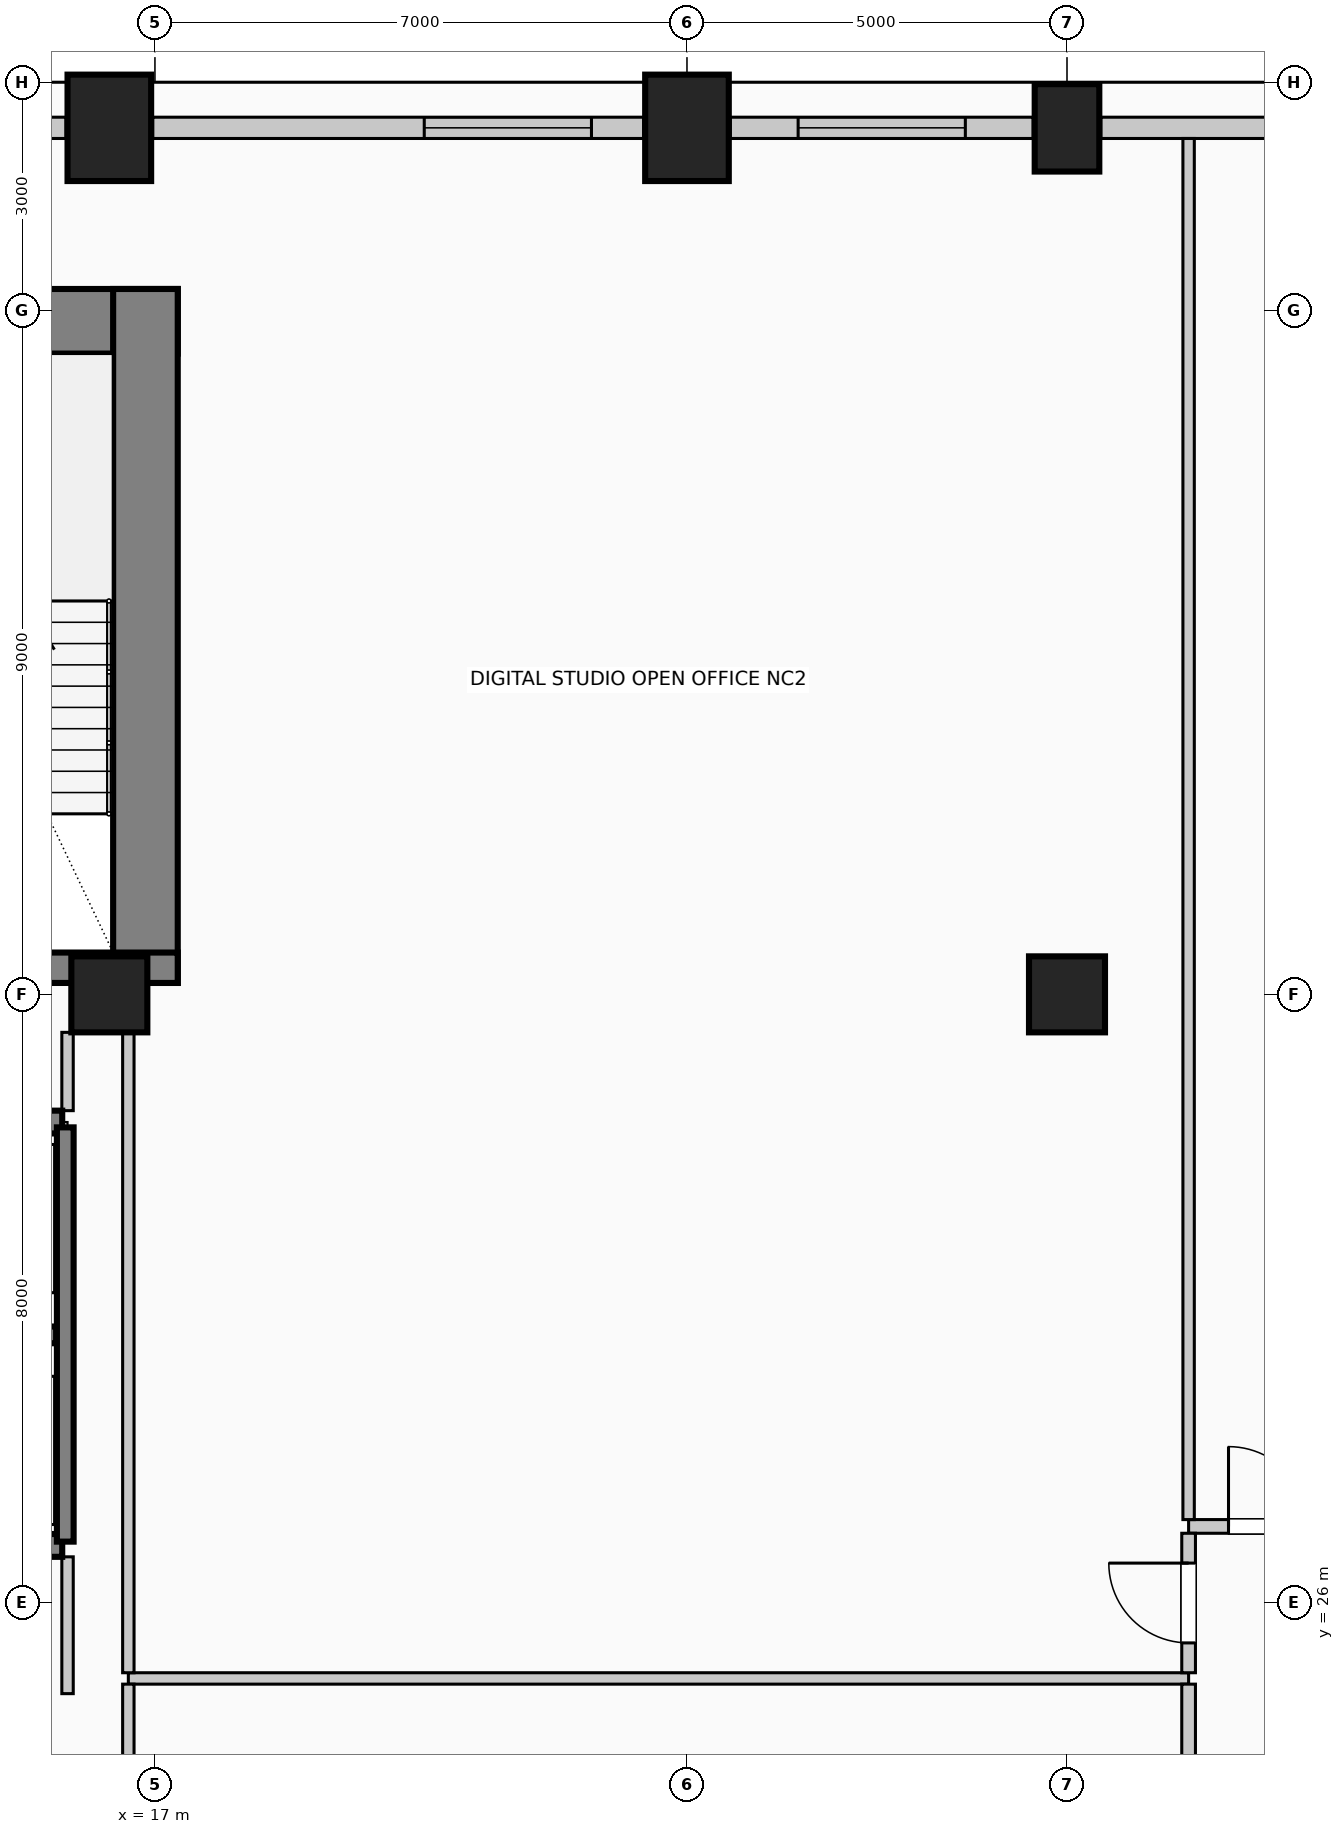
"""IFC4 building model, lengths in metres.
Left out: names, types, materials, properties, quantities, classifications, styles, units other than length and angle.
Written with IfcOpenShell. Run it as: python <this file> out.ifc"""

import sys

from ifc_helpers import new_model, si_unit, direction, frame, frame_2d, origin, origin_2d, place, context, subcontext, project, spatial, rectangle, circle, extrude, element, fill, save


model = new_model("IFC4")
c1 = context("Model", 3, precision=1e-05, world=origin(), true_north=direction((0.0, 1.0)))
c2 = subcontext(c1, "Body", "Model", "MODEL_VIEW")
j1 = project(units=[si_unit("LENGTHUNIT", "METRE"), si_unit("PLANEANGLEUNIT", "RADIAN")], contexts=[c1])
p1 = place(None, origin())
s1 = spatial("IfcSite", under=j1, at=p1, CompositionType="ELEMENT")
p2 = place(p1, origin())
s2 = spatial("IfcBuilding", under=s1, at=p2, CompositionType="ELEMENT")
p3 = place(p2, frame((0.0, 0.0, 92.6)))
s3 = spatial("IfcBuildingStorey", under=s2, at=p3, CompositionType="ELEMENT", Elevation=92.6)
p4 = place(p3, frame((2.7, 42.855, 0.0), z_axis=(0.0, 0.0, 1.0), x_axis=(1.0, 0.0, 0.0)))
e1 = element("IfcWall", 1, at=p4, inside=s3, PredefinedType="SHEAR", context=c2, shape_type="SweptSolid", body=[
    extrude(rectangle(XDim=14.6, YDim=0.85, at=frame_2d((7.3, 0.0))), origin(), (0.0, 0.0, 1.0), 4.0),
])
p5 = place(p3, frame((16.875, 34.15, 0.0), z_axis=(0.0, 0.0, 1.0), x_axis=(0.0, 1.0, 0.0)))
e2 = element("IfcWall", 2, at=p5, inside=s3, PredefinedType="SHEAR", context=c2, shape_type="SweptSolid", body=[
    extrude(rectangle(XDim=9.13, YDim=0.85, at=frame_2d((4.565, 0.0))), origin(), (0.0, 0.0, 1.0), 4.0),
])
p6 = place(p3, frame((12.29, 34.35, 0.0), z_axis=(0.0, 0.0, 1.0), x_axis=(1.0, 0.0, 0.0)))
e3 = element("IfcWall", 3, at=p6, inside=s3, PredefinedType="SHEAR", context=c2, shape_type="SweptSolid", body=[
    extrude(rectangle(XDim=5.01, YDim=0.4, at=frame_2d((2.505, 0.0))), origin(), (0.0, 0.0, 1.0), 4.0),
])
p7 = place(p6, frame((1.4, 0.0, 0.0)))
e4 = element("IfcOpeningElement", 4, at=p7, cuts=e3, PredefinedType="OPENING", context=c2, shape_type="SweptSolid", body=[
    extrude(rectangle(XDim=1.15, YDim=2.2, at=frame_2d((0.575, 1.1))), frame((0.0, 0.21, 0.0), z_axis=(0.0, -1.0, 0.0), x_axis=(1.0, 0.0, 0.0)), (0.0, 0.0, 1.0), 0.42),
])
for number, where, z_axis, x_axis in (
    (5, (16.4, 45.4, 0.0), (0.0, 0.0, 1.0), (1.0, 0.0, 0.0)),
    (6, (24.0, 45.4, 0.0), (0.0, 0.0, 1.0), (1.0, 0.0, 0.0)),
):
    element("IfcColumn", number, at=place(p3, frame(where, z_axis=z_axis, x_axis=x_axis)), inside=s3, PredefinedType="COLUMN", context=c2, shape_type="SweptSolid", body=[
        extrude(rectangle(XDim=1.1, YDim=1.4, at=origin_2d()), origin(), (0.0, 0.0, 1.0), 4.0),
    ])
p8 = place(p3, frame((29.0, 45.4, 0.0), z_axis=(0.0, 0.0, 1.0), x_axis=(1.0, 0.0, 0.0)))
e7 = element("IfcColumn", 7, at=p8, inside=s3, PredefinedType="COLUMN", context=c2, shape_type="SweptSolid", body=[
    extrude(rectangle(XDim=0.85, YDim=1.15, at=origin_2d()), origin(), (0.0, 0.0, 1.0), 4.0),
])
for number, where, z_axis, x_axis in (
    (8, (16.4, 34.0, 0.0), (0.0, 0.0, 1.0), (1.0, 0.0, 0.0)),
    (9, (29.0, 34.0, 0.0), (0.0, 0.0, 1.0), (1.0, 0.0, 0.0)),
):
    element("IfcColumn", number, at=place(p3, frame(where, z_axis=z_axis, x_axis=x_axis)), inside=s3, PredefinedType="COLUMN", context=c2, shape_type="SweptSolid", body=[
        extrude(circle(Radius=0.5, at=origin_2d()), origin(), (0.0, 0.0, 1.0), 4.0),
    ])
p9 = place(p3, frame((14.445, 45.4, 0.0), z_axis=(0.0, 0.0, 1.0), x_axis=(1.0, 0.0, 0.0)))
e10 = element("IfcWall", 10, at=p9, inside=s3, PredefinedType="SOLIDWALL", context=c2, shape_type="SweptSolid", body=[
    extrude(rectangle(XDim=1.385, YDim=0.28, at=frame_2d((0.692, 0.0))), origin(), (0.0, 0.0, 1.0), 2.875),
])
p10 = place(p3, frame((16.97, 45.4, 0.0), z_axis=(0.0, 0.0, 1.0), x_axis=(1.0, 0.0, 0.0)))
e11 = element("IfcWall", 11, at=p10, inside=s3, PredefinedType="SOLIDWALL", context=c2, shape_type="SweptSolid", body=[
    extrude(rectangle(XDim=6.46, YDim=0.28, at=frame_2d((3.23, 0.0))), origin(), (0.0, 0.0, 1.0), 2.875),
])
p11 = place(p10, frame((3.573, 0.0, 0.5)))
e12 = element("IfcOpeningElement", 12, at=p11, cuts=e11, PredefinedType="OPENING", context=c2, shape_type="SweptSolid", body=[
    extrude(rectangle(XDim=2.2, YDim=1.95, at=frame_2d((1.1, 0.975))), frame((0.0, 0.15, 0.0), z_axis=(0.0, -1.0, 0.0), x_axis=(1.0, 0.0, 0.0)), (0.0, 0.0, 1.0), 0.3),
])
p12 = place(p3, frame((24.57, 45.4, 0.0), z_axis=(0.0, 0.0, 1.0), x_axis=(1.0, 0.0, 0.0)))
e13 = element("IfcWall", 13, at=p12, inside=s3, PredefinedType="SOLIDWALL", context=c2, shape_type="SweptSolid", body=[
    extrude(rectangle(XDim=3.985, YDim=0.28, at=frame_2d((1.992, 0.0))), origin(), (0.0, 0.0, 1.0), 2.875),
])
p13 = place(p12, frame((0.893, 0.0, 0.5)))
e14 = element("IfcOpeningElement", 14, at=p13, cuts=e13, PredefinedType="OPENING", context=c2, shape_type="SweptSolid", body=[
    extrude(rectangle(XDim=2.2, YDim=1.95, at=frame_2d((1.1, 0.975))), frame((0.0, 0.15, 0.0), z_axis=(0.0, -1.0, 0.0), x_axis=(1.0, 0.0, 0.0)), (0.0, 0.0, 1.0), 0.3),
])
p14 = place(p3, frame((29.445, 45.4, 0.0), z_axis=(0.0, 0.0, 1.0), x_axis=(1.0, 0.0, 0.0)))
e15 = element("IfcWall", 15, at=p14, inside=s3, PredefinedType="SOLIDWALL", context=c2, shape_type="SweptSolid", body=[
    extrude(rectangle(XDim=3.985, YDim=0.28, at=frame_2d((1.992, 0.0))), origin(), (0.0, 0.0, 1.0), 2.875),
])
p15 = place(p3, frame((15.78, 26.75, 0.0), z_axis=(0.0, 0.0, 1.0), x_axis=(-1.0, 0.0, 0.0)))
e16 = element("IfcWall", 16, at=p15, inside=s3, PredefinedType="SOLIDWALL", context=c2, shape_type="SweptSolid", body=[
    extrude(rectangle(XDim=1.78, YDim=0.3, at=frame_2d((0.89, 0.0))), origin(), (0.0, 0.0, 1.0), 4.0),
])
p16 = place(p15, frame((0.34, 0.0, 0.0)))
e17 = element("IfcOpeningElement", 17, at=p16, cuts=e16, PredefinedType="OPENING", context=c2, shape_type="SweptSolid", body=[
    extrude(rectangle(XDim=1.1, YDim=2.2, at=frame_2d((0.55, 1.1))), frame((0.0, 0.16, 0.0), z_axis=(0.0, -1.0, 0.0), x_axis=(1.0, 0.0, 0.0)), (0.0, 0.0, 1.0), 0.32),
])
p17 = place(p3, frame((14.0, 32.32, 0.0), z_axis=(0.0, 0.0, 1.0), x_axis=(1.0, 0.0, 0.0)))
e18 = element("IfcWall", 18, at=p17, inside=s3, PredefinedType="SOLIDWALL", context=c2, shape_type="SweptSolid", body=[
    extrude(rectangle(XDim=1.78, YDim=0.3, at=frame_2d((0.89, 0.0))), origin(), (0.0, 0.0, 1.0), 4.0),
])
p18 = place(p17, frame((0.34, 0.0, 0.0)))
e19 = element("IfcOpeningElement", 19, at=p18, cuts=e18, PredefinedType="OPENING", context=c2, shape_type="SweptSolid", body=[
    extrude(rectangle(XDim=1.1, YDim=2.2, at=frame_2d((0.55, 1.1))), frame((0.0, 0.16, 0.0), z_axis=(0.0, -1.0, 0.0), x_axis=(1.0, 0.0, 0.0)), (0.0, 0.0, 1.0), 0.32),
])
p19 = place(p3, frame((15.82, 26.8, 0.0), z_axis=(0.0, 0.0, 1.0), x_axis=(0.0, 1.0, 0.0)))
e20 = element("IfcWall", 20, at=p19, inside=s3, PredefinedType="SOLIDWALL", context=c2, shape_type="SweptSolid", body=[
    extrude(rectangle(XDim=5.45, YDim=0.22, at=frame_2d((2.725, 0.0))), origin(), (0.0, 0.0, 1.0), 4.0),
])
p20 = place(p3, frame((12.3, 29.52, 0.0), z_axis=(0.0, 0.0, 1.0), x_axis=(1.0, 0.0, 0.0)))
e21 = element("IfcWall", 21, at=p20, inside=s3, PredefinedType="SOLIDWALL", context=c2, shape_type="SweptSolid", body=[
    extrude(rectangle(XDim=3.4, YDim=0.22, at=frame_2d((1.7, 0.0))), origin(), (0.0, 0.0, 1.0), 4.0),
])
p21 = place(p3, frame((16.65, 25.0, 0.0), z_axis=(0.0, 0.0, 1.0), x_axis=(1.0, 0.0, 0.0)))
e22 = element("IfcWall", 22, at=p21, inside=s3, PredefinedType="PARTITIONING", context=c2, shape_type="SweptSolid", body=[
    extrude(rectangle(XDim=13.95, YDim=0.15, at=frame_2d((6.975, 0.0))), origin(), (0.0, 0.0, 1.0), 3.725),
])
p22 = place(p3, frame((30.6, 27.0, 0.0), z_axis=(0.0, 0.0, 1.0), x_axis=(1.0, 0.0, 0.0)))
e23 = element("IfcWall", 23, at=p22, inside=s3, PredefinedType="PARTITIONING", context=c2, shape_type="SweptSolid", body=[
    extrude(rectangle(XDim=2.1, YDim=0.18, at=frame_2d((1.05, 0.0))), origin(), (0.0, 0.0, 1.0), 3.725),
])
p23 = place(p22, frame((0.525, 0.0, 0.0)))
e24 = element("IfcOpeningElement", 24, at=p23, cuts=e23, PredefinedType="OPENING", context=c2, shape_type="SweptSolid", body=[
    extrude(rectangle(XDim=1.05, YDim=2.15, at=frame_2d((0.525, 1.075))), frame((0.0, 0.1, 0.0), z_axis=(0.0, -1.0, 0.0), x_axis=(1.0, 0.0, 0.0)), (0.0, 0.0, 1.0), 0.2),
])
p24 = place(p3, frame((15.85, 24.8, 0.0), z_axis=(0.0, 0.0, 1.0), x_axis=(0.0, 1.0, 0.0)))
e25 = element("IfcWall", 25, at=p24, inside=s3, PredefinedType="PARTITIONING", context=c2, shape_type="SweptSolid", body=[
    extrude(rectangle(XDim=1.8, YDim=0.15, at=frame_2d((0.9, 0.0))), origin(), (0.0, 0.0, 1.0), 3.725),
])
p25 = place(p3, frame((15.85, 32.47, 0.0), z_axis=(0.0, 0.0, 1.0), x_axis=(0.0, 1.0, 0.0)))
e26 = element("IfcWall", 26, at=p25, inside=s3, PredefinedType="PARTITIONING", context=c2, shape_type="SweptSolid", body=[
    extrude(rectangle(XDim=1.03, YDim=0.15, at=frame_2d((0.515, 0.0))), origin(), (0.0, 0.0, 1.0), 3.725),
])
p26 = place(p3, frame((16.65, 18.5, 0.0), z_axis=(0.0, 0.0, 1.0), x_axis=(0.0, 1.0, 0.0)))
e27 = element("IfcWall", 27, at=p26, inside=s3, PredefinedType="PARTITIONING", context=c2, shape_type="SweptSolid", body=[
    extrude(rectangle(XDim=6.425, YDim=0.15, at=frame_2d((3.212, 0.0))), origin(), (0.0, 0.0, 1.0), 3.07),
])
p27 = place(p3, frame((16.65, 25.075, 0.0), z_axis=(0.0, 0.0, 1.0), x_axis=(0.0, 1.0, 0.0)))
e28 = element("IfcWall", 28, at=p27, inside=s3, PredefinedType="PARTITIONING", context=c2, shape_type="SweptSolid", body=[
    extrude(rectangle(XDim=8.425, YDim=0.15, at=frame_2d((4.212, 0.0))), origin(), (0.0, 0.0, 1.0), 3.07),
])
p28 = place(p3, frame((30.6, 15.74, 0.0), z_axis=(0.0, 0.0, 1.0), x_axis=(0.0, 1.0, 0.0)))
e29 = element("IfcWall", 29, at=p28, inside=s3, PredefinedType="PARTITIONING", context=c2, shape_type="SweptSolid", body=[
    extrude(rectangle(XDim=9.185, YDim=0.18, at=frame_2d((4.593, 0.0))), origin(), (0.0, 0.0, 1.0), 3.725),
])
p29 = place(p3, frame((30.6, 25.075, 0.0), z_axis=(0.0, 0.0, 1.0), x_axis=(0.0, 1.0, 0.0)))
e30 = element("IfcWall", 30, at=p29, inside=s3, PredefinedType="PARTITIONING", context=c2, shape_type="SweptSolid", body=[
    extrude(rectangle(XDim=1.835, YDim=0.18, at=frame_2d((0.917, 0.0))), origin(), (0.0, 0.0, 1.0), 3.725),
])
p30 = place(p29, frame((0.393, 0.0, 0.0)))
e31 = element("IfcOpeningElement", 31, at=p30, cuts=e30, PredefinedType="OPENING", context=c2, shape_type="SweptSolid", body=[
    extrude(rectangle(XDim=1.05, YDim=2.15, at=frame_2d((0.525, 1.075))), frame((0.0, 0.1, 0.0), z_axis=(0.0, -1.0, 0.0), x_axis=(1.0, 0.0, 0.0)), (0.0, 0.0, 1.0), 0.2),
])
p31 = place(p3, frame((30.6, 27.09, 0.0), z_axis=(0.0, 0.0, 1.0), x_axis=(0.0, 1.0, 0.0)))
e32 = element("IfcWall", 32, at=p31, inside=s3, PredefinedType="PARTITIONING", context=c2, shape_type="SweptSolid", body=[
    extrude(rectangle(XDim=18.17, YDim=0.15, at=frame_2d((9.085, 0.0))), origin(), (0.0, 0.0, 1.0), 3.725),
])
p32 = place(p11, origin())
e33 = element("IfcWindow", 33, at=p32, inside=s3, PartitioningType="SINGLE_PANEL", PredefinedType="WINDOW", context=c2, shape_type="SweptSolid", body=[
    extrude(rectangle(XDim=2.2, YDim=1.95, at=frame_2d((1.1, 0.975))), frame((0.0, 0.03, 0.0), z_axis=(0.0, -1.0, 0.0), x_axis=(1.0, 0.0, 0.0)), (0.0, 0.0, 1.0), 0.06),
])
fill(e12, e33)
p33 = place(p13, origin())
e34 = element("IfcWindow", 34, at=p33, inside=s3, PartitioningType="SINGLE_PANEL", PredefinedType="WINDOW", context=c2, shape_type="SweptSolid", body=[
    extrude(rectangle(XDim=2.2, YDim=1.95, at=frame_2d((1.1, 0.975))), frame((0.0, 0.03, 0.0), z_axis=(0.0, -1.0, 0.0), x_axis=(1.0, 0.0, 0.0)), (0.0, 0.0, 1.0), 0.06),
])
fill(e14, e34)
p34 = place(p23, origin())
e35 = element("IfcDoor", 35, at=p34, inside=s3, OperationType="SINGLE_SWING_LEFT", PredefinedType="DOOR", context=c2, shape_type="SweptSolid", body=[
    extrude(rectangle(XDim=1.05, YDim=2.15, at=frame_2d((0.525, 1.075))), frame((0.0, 0.025, 0.0), z_axis=(0.0, -1.0, 0.0), x_axis=(1.0, 0.0, 0.0)), (0.0, 0.0, 1.0), 0.05),
])
fill(e24, e35)
p35 = place(p30, origin())
e36 = element("IfcDoor", 36, at=p35, inside=s3, OperationType="SINGLE_SWING_RIGHT", PredefinedType="DOOR", context=c2, shape_type="SweptSolid", body=[
    extrude(rectangle(XDim=1.05, YDim=2.15, at=frame_2d((0.525, 1.075))), frame((0.0, 0.025, 0.0), z_axis=(0.0, -1.0, 0.0), x_axis=(1.0, 0.0, 0.0)), (0.0, 0.0, 1.0), 0.05),
])
fill(e31, e36)
save(model, sys.argv[1])
